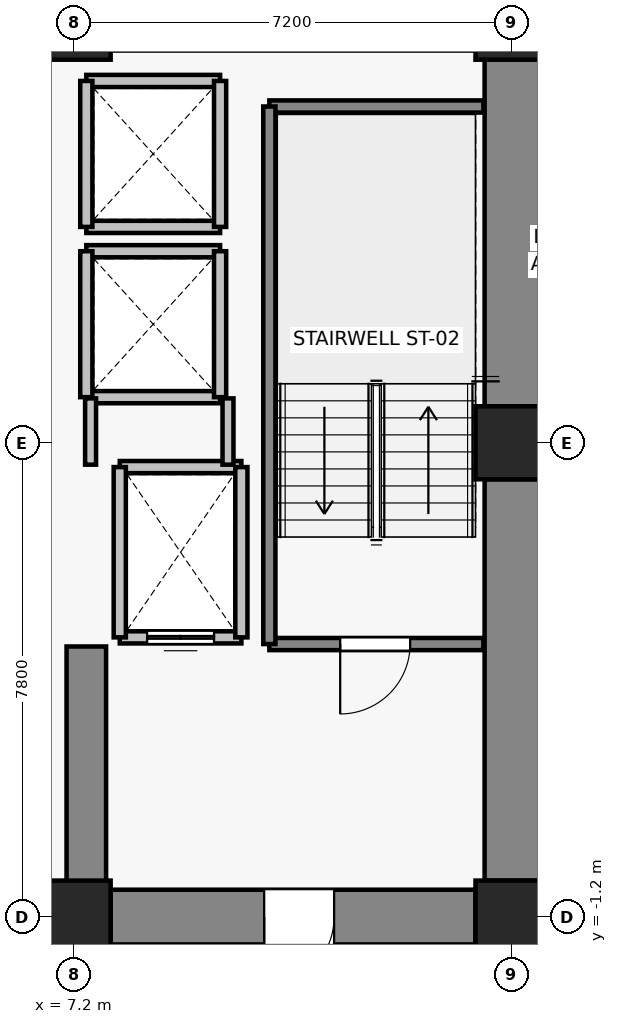
"""IFC4 building model, lengths in metres.
Left out: names, types, materials, properties, quantities, classifications, styles, units other than length and angle.
Written with IfcOpenShell. Run it as: python <this file> out.ifc"""

import sys

from ifc_helpers import new_model, si_unit, direction, frame, frame_2d, origin, origin_2d, place, context, subcontext, project, spatial, rectangle, extrude, source, transform, mapped, element, fill, save


model = new_model("IFC4")
c1 = context("Model", 3, precision=1e-05, world=origin(), true_north=direction((0.0, 1.0)))
c2 = subcontext(c1, "Body", "Model", "MODEL_VIEW")
j1 = project(units=[si_unit("LENGTHUNIT", "METRE"), si_unit("PLANEANGLEUNIT", "RADIAN")], contexts=[c1])
p1 = place(None, origin())
s1 = spatial("IfcSite", under=j1, at=p1, CompositionType="ELEMENT")
p2 = place(p1, origin())
s2 = spatial("IfcBuilding", under=s1, at=p2, CompositionType="ELEMENT")
p3 = place(p2, frame((0.0, 0.0, 73.6)))
s3 = spatial("IfcBuildingStorey", under=s2, at=p3, CompositionType="ELEMENT", Elevation=73.6)
for number, where, z_axis, x_axis in (
    (1, (7.2, -1.2, 0.0), (0.0, 0.0, 1.0), (1.0, 0.0, 0.0)),
    (2, (14.4, -1.2, 0.0), (0.0, 0.0, 1.0), (1.0, 0.0, 0.0)),
    (3, (14.4, 6.6, 0.0), (0.0, 0.0, 1.0), (1.0, 0.0, 0.0)),
    (4, (7.2, 13.5, 0.0), (0.0, 0.0, 1.0), (1.0, 0.0, 0.0)),
    (5, (14.4, 13.5, 0.0), (0.0, 0.0, 1.0), (1.0, 0.0, 0.0)),
):
    element("IfcColumn", number, at=place(p3, frame(where, z_axis=z_axis, x_axis=x_axis)), inside=s3, PredefinedType="COLUMN", context=c2, shape_type="SweptSolid", body=[
        extrude(rectangle(XDim=1.2, YDim=1.2, at=origin_2d()), origin(), (0.0, 0.0, 1.0), 3.3),
    ])
p4 = place(p3, frame((14.4, -0.6, 0.0), z_axis=(0.0, 0.0, 1.0), x_axis=(0.0, 1.0, 0.0)))
e6 = element("IfcWall", 6, at=p4, inside=s3, PredefinedType="SHEAR", context=c2, shape_type="SweptSolid", body=[
    extrude(rectangle(XDim=6.6, YDim=0.9, at=frame_2d((3.3, 0.0))), origin(), (0.0, 0.0, 1.0), 3.075),
])
p5 = place(p3, frame((14.4, 7.2, 0.0), z_axis=(0.0, 0.0, 1.0), x_axis=(0.0, 1.0, 0.0)))
e7 = element("IfcWall", 7, at=p5, inside=s3, PredefinedType="SHEAR", context=c2, shape_type="SweptSolid", body=[
    extrude(rectangle(XDim=5.7, YDim=0.9, at=frame_2d((2.85, 0.0))), origin(), (0.0, 0.0, 1.0), 3.075),
])
p6 = place(p3, frame((13.8, -1.2, 0.0), z_axis=(0.0, 0.0, 1.0), x_axis=(-1.0, 0.0, 0.0)))
e8 = element("IfcWall", 8, at=p6, inside=s3, PredefinedType="SHEAR", context=c2, shape_type="SweptSolid", body=[
    extrude(rectangle(XDim=6.0, YDim=0.9, at=frame_2d((3.0, 0.0))), origin(), (0.0, 0.0, 1.0), 3.075),
])
p7 = place(p6, frame((2.325, 0.0, 0.0)))
e9 = element("IfcOpeningElement", 9, at=p7, cuts=e8, PredefinedType="OPENING", context=c2, shape_type="SweptSolid", body=[
    extrude(rectangle(XDim=1.15, YDim=2.15, at=frame_2d((0.575, 1.075))), frame((0.0, 0.46, 0.0), z_axis=(0.0, -1.0, 0.0), x_axis=(1.0, 0.0, 0.0)), (0.0, 0.0, 1.0), 0.92),
])
p8 = place(p3, frame((7.4, -0.75, 0.0), z_axis=(0.0, 0.0, 1.0), x_axis=(0.0, 1.0, 0.0)))
e10 = element("IfcWall", 10, at=p8, inside=s3, PredefinedType="SHEAR", context=c2, shape_type="SweptSolid", body=[
    extrude(rectangle(XDim=4.0, YDim=0.65, at=frame_2d((2.0, 0.0))), origin(), (0.0, 0.0, 1.0), 3.075),
])
p9 = place(p3, frame((9.95, 3.4, 0.0), z_axis=(0.0, 0.0, 1.0), x_axis=(-1.0, 0.0, 0.0)))
e11 = element("IfcWall", 11, at=p9, inside=s3, PredefinedType="SOLIDWALL", context=c2, shape_type="SweptSolid", body=[
    extrude(rectangle(XDim=2.0, YDim=0.2, at=frame_2d((1.0, 0.0))), origin(), (0.0, 0.0, 1.0), 3.075),
])
p10 = place(p9, frame((0.45, 0.0, 0.0)))
e12 = element("IfcOpeningElement", 12, at=p10, cuts=e11, PredefinedType="OPENING", context=c2, shape_type="SweptSolid", body=[
    extrude(rectangle(XDim=1.1, YDim=2.2, at=frame_2d((0.55, 1.1))), frame((0.0, 0.11, 0.0), z_axis=(0.0, -1.0, 0.0), x_axis=(1.0, 0.0, 0.0)), (0.0, 0.0, 1.0), 0.22),
])
p11 = place(p3, frame((7.95, 6.2, 0.0), z_axis=(0.0, 0.0, 1.0), x_axis=(1.0, 0.0, 0.0)))
e13 = element("IfcWall", 13, at=p11, inside=s3, PredefinedType="SOLIDWALL", context=c2, shape_type="SweptSolid", body=[
    extrude(rectangle(XDim=2.0, YDim=0.2, at=frame_2d((1.0, 0.0))), origin(), (0.0, 0.0, 1.0), 3.075),
])
for number, where, z_axis, x_axis in (
    (14, (7.95, 3.4, 0.0), (0.0, 0.0, 1.0), (0.0, 1.0, 0.0)),
    (15, (9.95, 6.2, 0.0), (0.0, 0.0, 1.0), (0.0, -1.0, 0.0)),
):
    element("IfcWall", number, at=place(p3, frame(where, z_axis=z_axis, x_axis=x_axis)), inside=s3, PredefinedType="SOLIDWALL", context=c2, shape_type="SweptSolid", body=[
        extrude(rectangle(XDim=2.8, YDim=0.2, at=frame_2d((1.4, 0.0))), origin(), (0.0, 0.0, 1.0), 3.075),
    ])
for number, where, z_axis, x_axis in (
    (16, (9.6, 7.35, 0.0), (0.0, 0.0, 1.0), (-1.0, 0.0, 0.0)),
    (17, (7.4, 9.75, 0.0), (0.0, 0.0, 1.0), (1.0, 0.0, 0.0)),
):
    element("IfcWall", number, at=place(p3, frame(where, z_axis=z_axis, x_axis=x_axis)), inside=s3, PredefinedType="SOLIDWALL", context=c2, shape_type="SweptSolid", body=[
        extrude(rectangle(XDim=2.2, YDim=0.2, at=frame_2d((1.1, 0.0))), origin(), (0.0, 0.0, 1.0), 2.465),
    ])
p12 = place(p3, frame((7.4, 7.35, 0.0), z_axis=(0.0, 0.0, 1.0), x_axis=(0.0, 1.0, 0.0)))
e18 = element("IfcWall", 18, at=p12, inside=s3, PredefinedType="SOLIDWALL", context=c2, shape_type="SweptSolid", body=[
    extrude(rectangle(XDim=2.4, YDim=0.2, at=frame_2d((1.2, 0.0))), origin(), (0.0, 0.0, 1.0), 2.465),
])
p13 = place(p3, frame((9.6, 9.75, 0.0), z_axis=(0.0, 0.0, 1.0), x_axis=(0.0, -1.0, 0.0)))
e19 = element("IfcWall", 19, at=p13, inside=s3, PredefinedType="SOLIDWALL", context=c2, shape_type="SweptSolid", body=[
    extrude(rectangle(XDim=2.4, YDim=0.2, at=frame_2d((1.2, 0.0))), origin(), (0.0, 0.0, 1.0), 3.075),
])
for number, where, z_axis, x_axis in (
    (20, (9.6, 10.15, 0.0), (0.0, 0.0, 1.0), (-1.0, 0.0, 0.0)),
    (21, (7.4, 12.55, 0.0), (0.0, 0.0, 1.0), (1.0, 0.0, 0.0)),
):
    element("IfcWall", number, at=place(p3, frame(where, z_axis=z_axis, x_axis=x_axis)), inside=s3, PredefinedType="SOLIDWALL", context=c2, shape_type="SweptSolid", body=[
        extrude(rectangle(XDim=2.2, YDim=0.2, at=frame_2d((1.1, 0.0))), origin(), (0.0, 0.0, 1.0), 2.465),
    ])
p14 = place(p3, frame((7.4, 10.15, 0.0), z_axis=(0.0, 0.0, 1.0), x_axis=(0.0, 1.0, 0.0)))
e22 = element("IfcWall", 22, at=p14, inside=s3, PredefinedType="SOLIDWALL", context=c2, shape_type="SweptSolid", body=[
    extrude(rectangle(XDim=2.4, YDim=0.2, at=frame_2d((1.2, 0.0))), origin(), (0.0, 0.0, 1.0), 2.465),
])
p15 = place(p3, frame((9.6, 12.55, 0.0), z_axis=(0.0, 0.0, 1.0), x_axis=(0.0, -1.0, 0.0)))
e23 = element("IfcWall", 23, at=p15, inside=s3, PredefinedType="SOLIDWALL", context=c2, shape_type="SweptSolid", body=[
    extrude(rectangle(XDim=2.4, YDim=0.2, at=frame_2d((1.2, 0.0))), origin(), (0.0, 0.0, 1.0), 3.075),
])
p16 = place(p3, frame((13.93, 3.29, 0.0), z_axis=(0.0, 0.0, 1.0), x_axis=(-1.0, 0.0, 0.0)))
e24 = element("IfcWall", 24, at=p16, inside=s3, PredefinedType="SOLIDWALL", context=c2, shape_type="SweptSolid", body=[
    extrude(rectangle(XDim=3.52, YDim=0.2, at=frame_2d((1.76, 0.0))), origin(), (0.0, 0.0, 1.0), 3.075),
])
p17 = place(p16, frame((1.205, 0.0, 0.0)))
e25 = element("IfcOpeningElement", 25, at=p17, cuts=e24, PredefinedType="OPENING", context=c2, shape_type="SweptSolid", body=[
    extrude(rectangle(XDim=1.15, YDim=2.15, at=frame_2d((0.575, 1.075))), frame((0.0, 0.11, 0.0), z_axis=(0.0, -1.0, 0.0), x_axis=(1.0, 0.0, 0.0)), (0.0, 0.0, 1.0), 0.22),
])
p18 = place(p3, frame((10.41, 12.13, 0.0), z_axis=(0.0, 0.0, 1.0), x_axis=(1.0, 0.0, 0.0)))
e26 = element("IfcWall", 26, at=p18, inside=s3, PredefinedType="SOLIDWALL", context=c2, shape_type="SweptSolid", body=[
    extrude(rectangle(XDim=3.52, YDim=0.2, at=frame_2d((1.76, 0.0))), origin(), (0.0, 0.0, 1.0), 3.075),
])
p19 = place(p3, frame((10.41, 3.29, 0.0), z_axis=(0.0, 0.0, 1.0), x_axis=(0.0, 1.0, 0.0)))
e27 = element("IfcWall", 27, at=p19, inside=s3, PredefinedType="SOLIDWALL", context=c2, shape_type="SweptSolid", body=[
    extrude(rectangle(XDim=8.84, YDim=0.2, at=frame_2d((4.42, 0.0))), origin(), (0.0, 0.0, 1.0), 3.075),
])
p20 = place(p3, frame((7.47, 6.24, 0.0), z_axis=(0.0, 0.0, 1.0), x_axis=(0.0, 1.0, 0.0)))
e28 = element("IfcWall", 28, at=p20, inside=s3, PredefinedType="PARTITIONING", context=c2, shape_type="SweptSolid", body=[
    extrude(rectangle(XDim=1.09, YDim=0.18, at=frame_2d((0.545, 0.0))), origin(), (0.0, 0.0, 1.0), 2.465),
])
p21 = place(p3, frame((9.73, 7.33, 0.0), z_axis=(0.0, 0.0, 1.0), x_axis=(0.0, -1.0, 0.0)))
e29 = element("IfcWall", 29, at=p21, inside=s3, PredefinedType="PARTITIONING", context=c2, shape_type="SweptSolid", body=[
    extrude(rectangle(XDim=1.09, YDim=0.18, at=frame_2d((0.545, 0.0))), origin(), (0.0, 0.0, 1.0), 3.075),
])
m1 = source(origin(), c2, "Body", "SweptSolid", [
    extrude(rectangle(XDim=1.1, YDim=2.2, at=frame_2d((0.55, 1.1))), frame((0.0, 0.025, 0.0), z_axis=(0.0, -1.0, 0.0), x_axis=(1.0, 0.0, 0.0)), (0.0, 0.0, 1.0), 0.05),
])
p22 = place(p10, origin())
e30 = element("IfcDoor", 30, at=p22, inside=s3, OperationType="DOUBLE_DOOR_SLIDING", PredefinedType="DOOR", context=c2, shape_type="MappedRepresentation", body=[
    mapped(m1, transform((0.0, 0.0, 0.0), x_axis=(1.0, 0.0, 0.0), y_axis=(0.0, 1.0, 0.0), z_axis=(0.0, 0.0, 1.0), scale=1.0)),
])
fill(e12, e30)
m2 = source(origin(), c2, "Body", "SweptSolid", [
    extrude(rectangle(XDim=1.15, YDim=2.15, at=frame_2d((0.575, 1.075))), frame((0.0, 0.025, 0.0), z_axis=(0.0, -1.0, 0.0), x_axis=(1.0, 0.0, 0.0)), (0.0, 0.0, 1.0), 0.05),
])
p23 = place(p17, origin())
e31 = element("IfcDoor", 31, at=p23, inside=s3, OperationType="SINGLE_SWING_RIGHT", PredefinedType="DOOR", context=c2, shape_type="MappedRepresentation", body=[
    mapped(m2, transform((0.0, 0.0, 0.0), x_axis=(1.0, 0.0, 0.0), y_axis=(0.0, 1.0, 0.0), z_axis=(0.0, 0.0, 1.0), scale=1.0)),
])
fill(e25, e31)
p24 = place(p7, origin())
e32 = element("IfcDoor", 32, at=p24, inside=s3, OperationType="SINGLE_SWING_RIGHT", PredefinedType="DOOR", context=c2, shape_type="MappedRepresentation", body=[
    mapped(m2, transform((0.0, 0.0, 0.0), x_axis=(1.0, 0.0, 0.0), y_axis=(0.0, 1.0, 0.0), z_axis=(0.0, 0.0, 1.0), scale=1.0)),
])
fill(e9, e32)
save(model, sys.argv[1])
